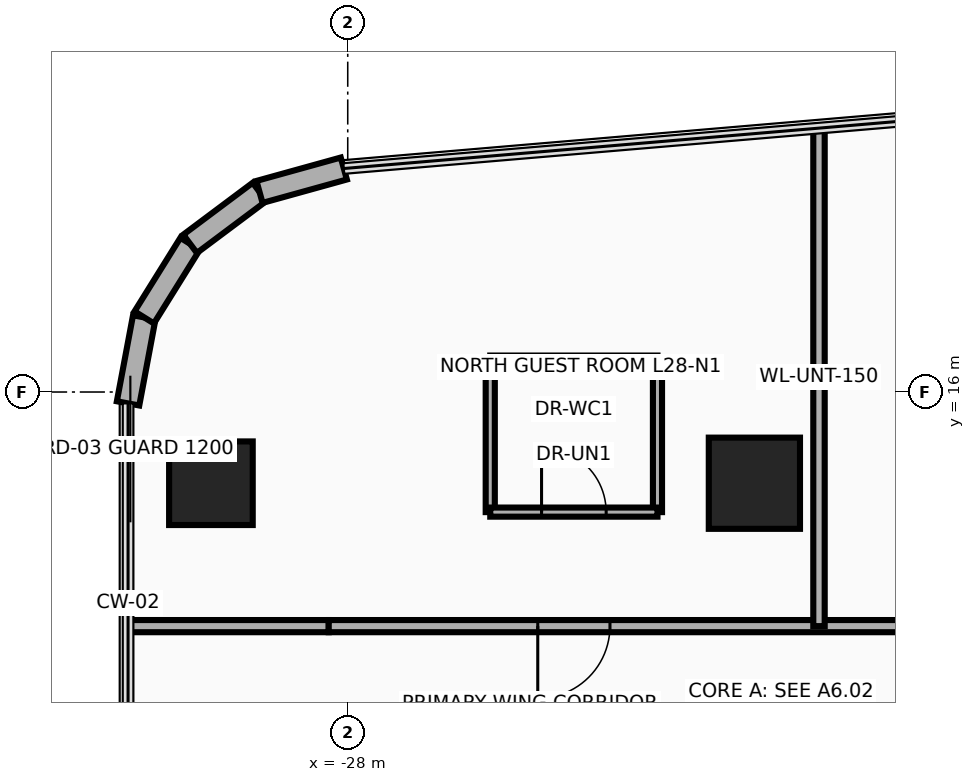
"""IFC4 building model, lengths in metres.
Left out: names, types, materials, properties, quantities, classifications, styles, units other than length and angle.
Written with IfcOpenShell. Run it as: python <this file> out.ifc"""

import sys

from ifc_helpers import new_model, si_unit, direction, frame, frame_2d, origin, origin_2d, place, context, subcontext, project, spatial, rectangle, circle, extrude, source, transform, mapped, element, fill, save


model = new_model("IFC4")
c1 = context("Model", 3, precision=1e-05, world=origin(), true_north=direction((0.0, 1.0)))
c2 = subcontext(c1, "Body", "Model", "MODEL_VIEW")
j1 = project(units=[si_unit("LENGTHUNIT", "METRE"), si_unit("PLANEANGLEUNIT", "RADIAN")], contexts=[c1])
p1 = place(None, origin())
s1 = spatial("IfcSite", under=j1, at=p1, CompositionType="ELEMENT")
p2 = place(p1, origin())
s2 = spatial("IfcBuilding", under=s1, at=p2, CompositionType="ELEMENT")
p3 = place(p2, frame((0.0, 0.0, 113.1)))
s3 = spatial("IfcBuildingStorey", under=s2, at=p3, CompositionType="ELEMENT", Elevation=113.1)
m1 = source(origin(), c2, "Body", "SweptSolid", [
    extrude(circle(Radius=0.55, at=origin_2d()), origin(), (0.0, 0.0, 1.0), 3.7),
])
p4 = place(p3, frame((-29.8, 14.8, 0.0), z_axis=(0.0, 0.0, 1.0), x_axis=(1.0, 0.0, 0.0)))
e1 = element("IfcColumn", 1, at=p4, inside=s3, PredefinedType="COLUMN", context=c2, shape_type="MappedRepresentation", body=[
    mapped(m1, transform((0.0, 0.0, 0.0), x_axis=(1.0, 0.0, 0.0), y_axis=(0.0, 1.0, 0.0), z_axis=(0.0, 0.0, 1.0), scale=1.0)),
])
m2 = source(origin(), c2, "Body", "SweptSolid", [
    extrude(rectangle(XDim=1.2, YDim=1.2, at=origin_2d()), origin(), (0.0, 0.0, 1.0), 3.7),
])
p5 = place(p3, frame((-22.65, 14.8, 0.0), z_axis=(0.0, 0.0, 1.0), x_axis=(1.0, 0.0, 0.0)))
e2 = element("IfcColumn", 2, at=p5, inside=s3, PredefinedType="COLUMN", context=c2, shape_type="MappedRepresentation", body=[
    mapped(m2, transform((0.0, 0.0, 0.0), x_axis=(1.0, 0.0, 0.0), y_axis=(0.0, 1.0, 0.0), z_axis=(0.0, 0.0, 1.0), scale=1.0)),
])
p6 = place(p3, frame((-30.89, 15.85, 0.0), z_axis=(0.0, 0.0, 1.0), x_axis=(0.184557499391, 0.982821718023, 0.0)))
e3 = element("IfcWall", 3, at=p6, inside=s3, PredefinedType="SOLIDWALL", context=c2, shape_type="SweptSolid", body=[
    extrude(rectangle(XDim=1.151, YDim=0.3, at=frame_2d((0.575, 0.0))), origin(), (0.0, 0.0, 1.0), 3.46),
])
p7 = place(p3, frame((-30.677, 16.981, 0.0), z_axis=(0.0, 0.0, 1.0), x_axis=(0.52880576008, 0.848742875143, 0.0)))
e4 = element("IfcWall", 4, at=p7, inside=s3, PredefinedType="SOLIDWALL", context=c2, shape_type="SweptSolid", body=[
    extrude(rectangle(XDim=1.141, YDim=0.3, at=frame_2d((0.57, 0.0))), origin(), (0.0, 0.0, 1.0), 3.46),
])
p8 = place(p3, frame((-30.074, 17.95, 0.0), z_axis=(0.0, 0.0, 1.0), x_axis=(0.800975009324, 0.598697782223, 0.0)))
e5 = element("IfcWall", 5, at=p8, inside=s3, PredefinedType="SOLIDWALL", context=c2, shape_type="SweptSolid", body=[
    extrude(rectangle(XDim=1.141, YDim=0.3, at=frame_2d((0.57, 0.0))), origin(), (0.0, 0.0, 1.0), 3.46),
])
p9 = place(p3, frame((-29.161, 18.633, 0.0), z_axis=(0.0, 0.0, 1.0), x_axis=(0.963624193367, 0.267260947313, 0.0)))
e6 = element("IfcWall", 6, at=p9, inside=s3, PredefinedType="SOLIDWALL", context=c2, shape_type="SweptSolid", body=[
    extrude(rectangle(XDim=1.151, YDim=0.3, at=frame_2d((0.575, 0.0))), origin(), (0.0, 0.0, 1.0), 3.46),
])
p10 = place(p3, frame((-30.89, 12.92, 0.0), z_axis=(0.0, 0.0, 1.0), x_axis=(1.0, 0.0, 0.0)))
e7 = element("IfcWall", 7, at=p10, inside=s3, PredefinedType="PARTITIONING", context=c2, shape_type="SweptSolid", body=[
    extrude(rectangle(XDim=2.64, YDim=0.16, at=frame_2d((1.32, 0.0))), origin(), (0.0, 0.0, 1.0), 2.896),
])
p11 = place(p3, frame((-28.25, 12.92, 0.0), z_axis=(0.0, 0.0, 1.0), x_axis=(1.0, 0.0, 0.0)))
e8 = element("IfcWall", 8, at=p11, inside=s3, PredefinedType="PARTITIONING", context=c2, shape_type="SweptSolid", body=[
    extrude(rectangle(XDim=41.8, YDim=0.16, at=frame_2d((20.9, 0.0))), origin(), (0.0, 0.0, 1.0), 2.666),
])
p12 = place(p11, frame((2.75, 0.0, 0.0)))
e9 = element("IfcOpeningElement", 9, at=p12, cuts=e8, PredefinedType="OPENING", context=c2, shape_type="SweptSolid", body=[
    extrude(rectangle(XDim=0.95, YDim=2.15, at=frame_2d((0.475, 1.075))), frame((0.0, 0.095, 0.0), z_axis=(0.0, -1.0, 0.0), x_axis=(1.0, 0.0, 0.0)), (0.0, 0.0, 1.0), 0.19),
])
p13 = place(p11, frame((10.135, 0.0, 0.0)))
e10 = element("IfcOpeningElement", 10, at=p13, cuts=e8, PredefinedType="OPENING", context=c2, shape_type="SweptSolid", body=[
    extrude(rectangle(XDim=0.95, YDim=2.15, at=frame_2d((0.475, 1.075))), frame((0.0, 0.095, 0.0), z_axis=(0.0, -1.0, 0.0), x_axis=(1.0, 0.0, 0.0)), (0.0, 0.0, 1.0), 0.19),
])
p14 = place(p11, frame((18.8, 0.0, 0.0)))
e11 = element("IfcOpeningElement", 11, at=p14, cuts=e8, PredefinedType="OPENING", context=c2, shape_type="SweptSolid", body=[
    extrude(rectangle(XDim=0.95, YDim=2.15, at=frame_2d((0.475, 1.075))), frame((0.0, 0.095, 0.0), z_axis=(0.0, -1.0, 0.0), x_axis=(1.0, 0.0, 0.0)), (0.0, 0.0, 1.0), 0.19),
])
p15 = place(p11, frame((27.81, 0.0, 0.0)))
e12 = element("IfcOpeningElement", 12, at=p15, cuts=e8, PredefinedType="OPENING", context=c2, shape_type="SweptSolid", body=[
    extrude(rectangle(XDim=0.95, YDim=2.15, at=frame_2d((0.475, 1.075))), frame((0.0, 0.095, 0.0), z_axis=(0.0, -1.0, 0.0), x_axis=(1.0, 0.0, 0.0)), (0.0, 0.0, 1.0), 0.19),
])
p16 = place(p11, frame((35.72, 0.0, 0.0)))
e13 = element("IfcOpeningElement", 13, at=p16, cuts=e8, PredefinedType="OPENING", context=c2, shape_type="SweptSolid", body=[
    extrude(rectangle(XDim=0.95, YDim=2.15, at=frame_2d((0.475, 1.075))), frame((0.0, 0.095, 0.0), z_axis=(0.0, -1.0, 0.0), x_axis=(1.0, 0.0, 0.0)), (0.0, 0.0, 1.0), 0.19),
])
p17 = place(p3, frame((-21.8, 12.92, 0.0), z_axis=(0.0, 0.0, 1.0), x_axis=(0.0, 1.0, 0.0)))
e14 = element("IfcWall", 14, at=p17, inside=s3, PredefinedType="PARTITIONING", context=c2, shape_type="SweptSolid", body=[
    extrude(rectangle(XDim=6.552, YDim=0.15, at=frame_2d((3.276, 0.0))), origin(), (0.0, 0.0, 1.0), 2.666),
])
for number, where, z_axis, x_axis in (
    (15, (-26.125, 14.42, 0.0), (0.0, 0.0, 1.0), (0.0, 1.0, 0.0)),
    (16, (-23.925, 14.42, 0.0), (0.0, 0.0, 1.0), (0.0, 1.0, 0.0)),
):
    element("IfcWall", number, at=place(p3, frame(where, z_axis=z_axis, x_axis=x_axis)), inside=s3, PredefinedType="PARTITIONING", context=c2, shape_type="SweptSolid", body=[
        extrude(rectangle(XDim=2.0, YDim=0.12, at=frame_2d((1.0, 0.0))), origin(), (0.0, 0.0, 1.0), 2.666),
    ])
p18 = place(p3, frame((-26.125, 16.42, 0.0), z_axis=(0.0, 0.0, 1.0), x_axis=(1.0, 0.0, 0.0)))
e17 = element("IfcWall", 17, at=p18, inside=s3, PredefinedType="PARTITIONING", context=c2, shape_type="SweptSolid", body=[
    extrude(rectangle(XDim=2.2, YDim=0.12, at=frame_2d((1.1, 0.0))), origin(), (0.0, 0.0, 1.0), 3.46),
])
p19 = place(p3, frame((-26.125, 14.42, 0.0), z_axis=(0.0, 0.0, 1.0), x_axis=(1.0, 0.0, 0.0)))
e18 = element("IfcWall", 18, at=p19, inside=s3, PredefinedType="PARTITIONING", context=c2, shape_type="SweptSolid", body=[
    extrude(rectangle(XDim=2.2, YDim=0.12, at=frame_2d((1.1, 0.0))), origin(), (0.0, 0.0, 1.0), 3.46),
])
p20 = place(p19, frame((0.675, 0.0, 0.0)))
e19 = element("IfcOpeningElement", 19, at=p20, cuts=e18, PredefinedType="OPENING", context=c2, shape_type="SweptSolid", body=[
    extrude(rectangle(XDim=0.85, YDim=2.1, at=frame_2d((0.425, 1.05))), frame((0.0, 0.075, 0.0), z_axis=(0.0, -1.0, 0.0), x_axis=(1.0, 0.0, 0.0)), (0.0, 0.0, 1.0), 0.15),
])
p21 = place(p12, frame((0.95, 0.0, 0.0), z_axis=(0.0, 0.0, 1.0), x_axis=(-1.0, 0.0, 0.0)))
e20 = element("IfcDoor", 20, at=p21, inside=s3, OperationType="SINGLE_SWING_LEFT", PredefinedType="DOOR", context=c2, shape_type="SweptSolid", body=[
    extrude(rectangle(XDim=0.95, YDim=2.15, at=frame_2d((0.475, 1.075))), frame((0.0, 0.025, 0.0), z_axis=(0.0, -1.0, 0.0), x_axis=(1.0, 0.0, 0.0)), (0.0, 0.0, 1.0), 0.05),
])
fill(e9, e20)
p22 = place(p20, origin())
e21 = element("IfcDoor", 21, at=p22, inside=s3, OperationType="SINGLE_SWING_RIGHT", PredefinedType="DOOR", context=c2, shape_type="SweptSolid", body=[
    extrude(rectangle(XDim=0.85, YDim=2.1, at=frame_2d((0.425, 1.05))), frame((0.0, 0.025, 0.0), z_axis=(0.0, -1.0, 0.0), x_axis=(1.0, 0.0, 0.0)), (0.0, 0.0, 1.0), 0.05),
])
fill(e19, e21)
save(model, sys.argv[1])
